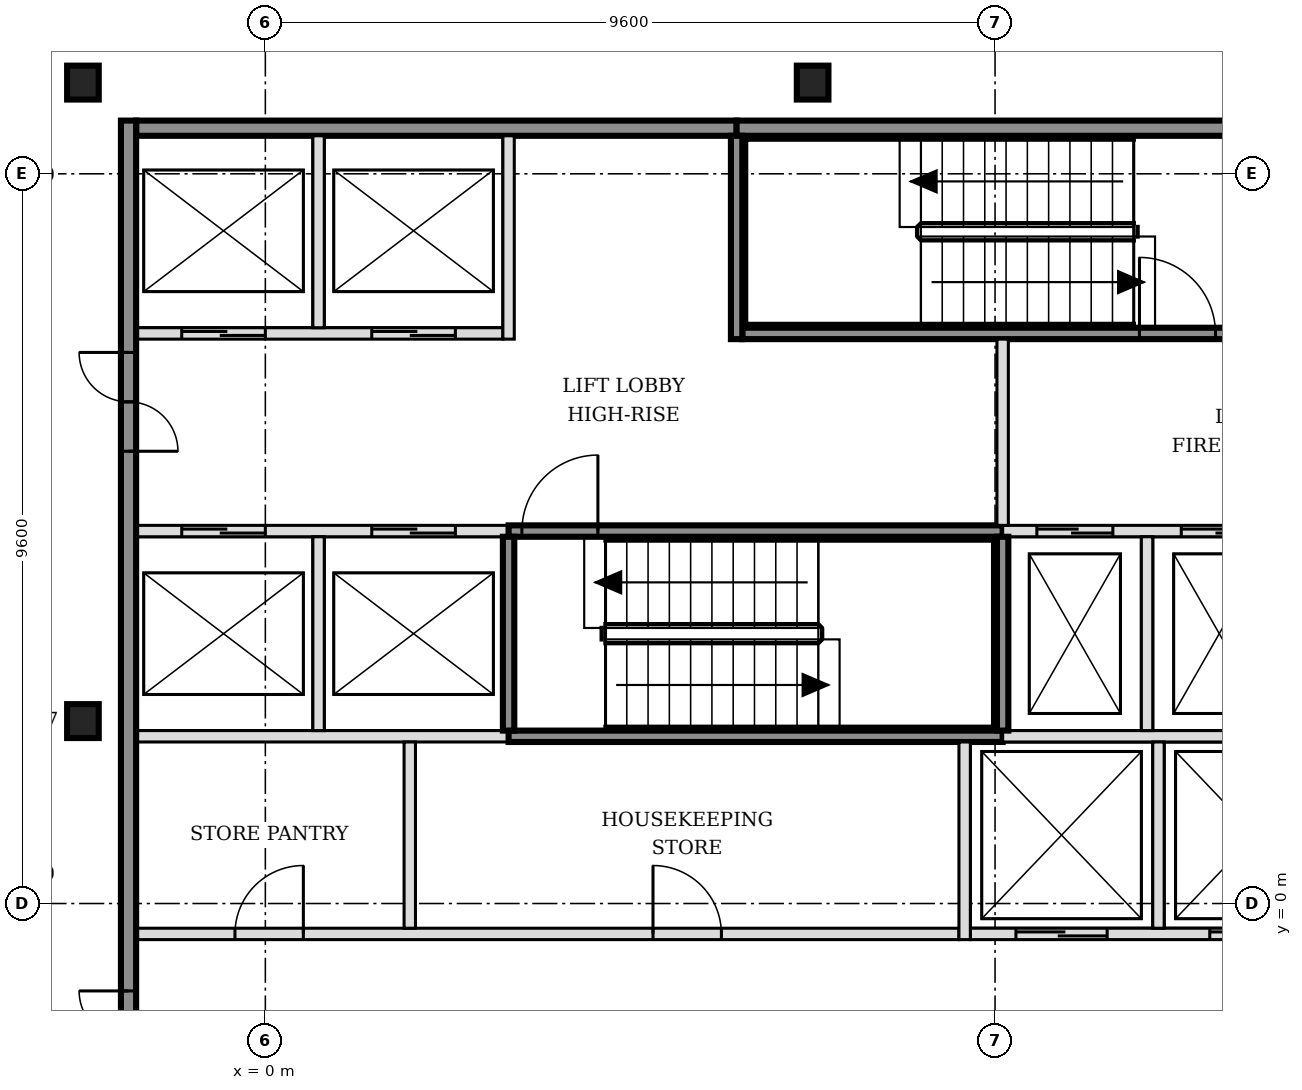
"""IFC4 building model, lengths in metres.
Left out: names, types, materials, properties, quantities, classifications, styles, units other than length and angle.
Written with IfcOpenShell. Run it as: python <this file> out.ifc"""

import sys

from ifc_helpers import new_model, si_unit, direction, frame, frame_2d, origin, origin_2d, place, context, subcontext, project, spatial, rectangle, i_section, extrude, element, fill, save


model = new_model("IFC4")
c1 = context("Model", 3, precision=1e-05, world=origin(), true_north=direction((0.0, 1.0)))
c2 = subcontext(c1, "Body", "Model", "MODEL_VIEW")
j1 = project(units=[si_unit("LENGTHUNIT", "METRE"), si_unit("PLANEANGLEUNIT", "RADIAN")], contexts=[c1])
p1 = place(None, origin())
s1 = spatial("IfcSite", under=j1, at=p1, CompositionType="ELEMENT")
p2 = place(p1, origin())
s2 = spatial("IfcBuilding", under=s1, at=p2, CompositionType="ELEMENT")
p3 = place(p2, frame((0.0, 0.0, 154.2)))
s3 = spatial("IfcBuildingStorey", under=s2, at=p3, CompositionType="ELEMENT", Elevation=154.2)
for number, where, z_axis, x_axis in (
    (1, (-2.4, 2.4, -0.15), (0.0, 0.0, 1.0), (1.0, 0.0, 0.0)),
    (2, (-2.4, 10.8, -0.15), (0.0, 0.0, 1.0), (1.0, 0.0, 0.0)),
    (3, (7.2, 10.8, -0.15), (0.0, 0.0, 1.0), (1.0, 0.0, 0.0)),
):
    element("IfcColumn", number, at=place(p3, frame(where, z_axis=z_axis, x_axis=x_axis)), inside=s3, PredefinedType="COLUMN", context=c2, shape_type="SweptSolid", body=[
        extrude(i_section(OverallWidth=0.416, OverallDepth=0.446, WebThickness=0.039, FlangeThickness=0.063, FilletRadius=0.015, at=origin_2d()), origin(), (0.0, 0.0, 1.0), 3.6),
    ])
p4 = place(p3, frame((-1.7, -0.4, 0.0), z_axis=(0.0, 0.0, 1.0), x_axis=(1.0, 0.0, 0.0)))
e4 = element("IfcWall", 4, at=p4, inside=s3, PredefinedType="PARTITIONING", context=c2, shape_type="SweptSolid", body=[
    extrude(rectangle(XDim=10.825, YDim=0.15, at=frame_2d((5.413, 0.0))), origin(), (0.0, 0.0, 1.0), 3.45),
])
p5 = place(p4, frame((1.3, 0.0, 0.0)))
e5 = element("IfcOpeningElement", 5, at=p5, cuts=e4, PredefinedType="OPENING", context=c2, shape_type="SweptSolid", body=[
    extrude(rectangle(XDim=0.9, YDim=2.1, at=frame_2d((0.45, 1.05))), frame((0.0, 0.085, 0.0), z_axis=(0.0, -1.0, 0.0), x_axis=(1.0, 0.0, 0.0)), (0.0, 0.0, 1.0), 0.17),
])
p6 = place(p4, frame((6.8, 0.0, 0.0)))
e6 = element("IfcOpeningElement", 6, at=p6, cuts=e4, PredefinedType="OPENING", context=c2, shape_type="SweptSolid", body=[
    extrude(rectangle(XDim=0.9, YDim=2.1, at=frame_2d((0.45, 1.05))), frame((0.0, 0.085, 0.0), z_axis=(0.0, -1.0, 0.0), x_axis=(1.0, 0.0, 0.0)), (0.0, 0.0, 1.0), 0.17),
])
p7 = place(p3, frame((9.275, -0.4, 0.0), z_axis=(0.0, 0.0, 1.0), x_axis=(1.0, 0.0, 0.0)))
e7 = element("IfcWall", 7, at=p7, inside=s3, PredefinedType="SOLIDWALL", context=c2, shape_type="SweptSolid", body=[
    extrude(rectangle(XDim=4.95, YDim=0.15, at=frame_2d((2.475, 0.0))), origin(), (0.0, 0.0, 1.0), 3.45),
])
p8 = place(p7, frame((0.6, 0.0, 0.0)))
e8 = element("IfcOpeningElement", 8, at=p8, cuts=e7, PredefinedType="OPENING", context=c2, shape_type="SweptSolid", body=[
    extrude(rectangle(XDim=1.2, YDim=2.1, at=frame_2d((0.6, 1.05))), frame((0.0, 0.085, 0.0), z_axis=(0.0, -1.0, 0.0), x_axis=(1.0, 0.0, 0.0)), (0.0, 0.0, 1.0), 0.17),
])
p9 = place(p7, frame((3.15, 0.0, 0.0)))
e9 = element("IfcOpeningElement", 9, at=p9, cuts=e7, PredefinedType="OPENING", context=c2, shape_type="SweptSolid", body=[
    extrude(rectangle(XDim=1.2, YDim=2.1, at=frame_2d((0.6, 1.05))), frame((0.0, 0.085, 0.0), z_axis=(0.0, -1.0, 0.0), x_axis=(1.0, 0.0, 0.0)), (0.0, 0.0, 1.0), 0.17),
])
p10 = place(p3, frame((-1.7, 2.2, 0.0), z_axis=(0.0, 0.0, 1.0), x_axis=(1.0, 0.0, 0.0)))
e10 = element("IfcWall", 10, at=p10, inside=s3, PredefinedType="SOLIDWALL", context=c2, shape_type="SweptSolid", body=[
    extrude(rectangle(XDim=4.9, YDim=0.15, at=frame_2d((2.45, 0.0))), origin(), (0.0, 0.0, 1.0), 3.45),
])
p11 = place(p3, frame((3.2, 2.2, 0.0), z_axis=(0.0, 0.0, 1.0), x_axis=(1.0, 0.0, 0.0)))
e11 = element("IfcWall", 11, at=p11, inside=s3, PredefinedType="SOLIDWALL", context=c2, shape_type="SweptSolid", body=[
    extrude(rectangle(XDim=6.5, YDim=0.15, at=frame_2d((3.25, 0.0))), origin(), (0.0, 0.0, 1.0), 3.45),
])
p12 = place(p3, frame((9.7, 2.2, 0.0), z_axis=(0.0, 0.0, 1.0), x_axis=(1.0, 0.0, 0.0)))
e12 = element("IfcWall", 12, at=p12, inside=s3, PredefinedType="SOLIDWALL", context=c2, shape_type="SweptSolid", body=[
    extrude(rectangle(XDim=4.525, YDim=0.15, at=frame_2d((2.263, 0.0))), origin(), (0.0, 0.0, 1.0), 3.45),
])
p13 = place(p3, frame((-1.7, 4.9, 0.0), z_axis=(0.0, 0.0, 1.0), x_axis=(1.0, 0.0, 0.0)))
e13 = element("IfcWall", 13, at=p13, inside=s3, PredefinedType="SOLIDWALL", context=c2, shape_type="SweptSolid", body=[
    extrude(rectangle(XDim=4.9, YDim=0.15, at=frame_2d((2.45, 0.0))), origin(), (0.0, 0.0, 1.0), 3.45),
])
p14 = place(p13, frame((0.6, 0.0, 0.0)))
e14 = element("IfcOpeningElement", 14, at=p14, cuts=e13, PredefinedType="OPENING", context=c2, shape_type="SweptSolid", body=[
    extrude(rectangle(XDim=1.1, YDim=2.1, at=frame_2d((0.55, 1.05))), frame((0.0, 0.085, 0.0), z_axis=(0.0, -1.0, 0.0), x_axis=(1.0, 0.0, 0.0)), (0.0, 0.0, 1.0), 0.17),
])
p15 = place(p13, frame((3.1, 0.0, 0.0)))
e15 = element("IfcOpeningElement", 15, at=p15, cuts=e13, PredefinedType="OPENING", context=c2, shape_type="SweptSolid", body=[
    extrude(rectangle(XDim=1.1, YDim=2.1, at=frame_2d((0.55, 1.05))), frame((0.0, 0.085, 0.0), z_axis=(0.0, -1.0, 0.0), x_axis=(1.0, 0.0, 0.0)), (0.0, 0.0, 1.0), 0.17),
])
p16 = place(p3, frame((3.2, 4.9, 0.0), z_axis=(0.0, 0.0, 1.0), x_axis=(1.0, 0.0, 0.0)))
e16 = element("IfcWall", 16, at=p16, inside=s3, PredefinedType="SOLIDWALL", context=c2, shape_type="SweptSolid", body=[
    extrude(rectangle(XDim=6.5, YDim=0.15, at=frame_2d((3.25, 0.0))), origin(), (0.0, 0.0, 1.0), 3.45),
])
p17 = place(p16, frame((0.175, 0.0, 0.0)))
e17 = element("IfcOpeningElement", 17, at=p17, cuts=e16, PredefinedType="OPENING", context=c2, shape_type="SweptSolid", body=[
    extrude(rectangle(XDim=1.0, YDim=2.1, at=frame_2d((0.5, 1.05))), frame((0.0, 0.085, 0.0), z_axis=(0.0, -1.0, 0.0), x_axis=(1.0, 0.0, 0.0)), (0.0, 0.0, 1.0), 0.17),
])
p18 = place(p3, frame((9.7, 4.9, 0.0), z_axis=(0.0, 0.0, 1.0), x_axis=(1.0, 0.0, 0.0)))
e18 = element("IfcWall", 18, at=p18, inside=s3, PredefinedType="SOLIDWALL", context=c2, shape_type="SweptSolid", body=[
    extrude(rectangle(XDim=6.4, YDim=0.15, at=frame_2d((3.2, 0.0))), origin(), (0.0, 0.0, 1.0), 3.45),
])
p19 = place(p18, frame((0.45, 0.0, 0.0)))
e19 = element("IfcOpeningElement", 19, at=p19, cuts=e18, PredefinedType="OPENING", context=c2, shape_type="SweptSolid", body=[
    extrude(rectangle(XDim=1.0, YDim=2.1, at=frame_2d((0.5, 1.05))), frame((0.0, 0.085, 0.0), z_axis=(0.0, -1.0, 0.0), x_axis=(1.0, 0.0, 0.0)), (0.0, 0.0, 1.0), 0.17),
])
p20 = place(p18, frame((2.35, 0.0, 0.0)))
e20 = element("IfcOpeningElement", 20, at=p20, cuts=e18, PredefinedType="OPENING", context=c2, shape_type="SweptSolid", body=[
    extrude(rectangle(XDim=1.0, YDim=2.1, at=frame_2d((0.5, 1.05))), frame((0.0, 0.085, 0.0), z_axis=(0.0, -1.0, 0.0), x_axis=(1.0, 0.0, 0.0)), (0.0, 0.0, 1.0), 0.17),
])
p21 = place(p18, frame((4.7, 0.0, 0.0)))
e21 = element("IfcOpeningElement", 21, at=p21, cuts=e18, PredefinedType="OPENING", context=c2, shape_type="SweptSolid", body=[
    extrude(rectangle(XDim=0.9, YDim=2.1, at=frame_2d((0.45, 1.05))), frame((0.0, 0.085, 0.0), z_axis=(0.0, -1.0, 0.0), x_axis=(1.0, 0.0, 0.0)), (0.0, 0.0, 1.0), 0.17),
])
p22 = place(p3, frame((-1.7, 7.5, 0.0), z_axis=(0.0, 0.0, 1.0), x_axis=(1.0, 0.0, 0.0)))
e22 = element("IfcWall", 22, at=p22, inside=s3, PredefinedType="SOLIDWALL", context=c2, shape_type="SweptSolid", body=[
    extrude(rectangle(XDim=4.825, YDim=0.15, at=frame_2d((2.413, 0.0))), origin(), (0.0, 0.0, 1.0), 3.45),
])
p23 = place(p22, frame((0.6, 0.0, 0.0)))
e23 = element("IfcOpeningElement", 23, at=p23, cuts=e22, PredefinedType="OPENING", context=c2, shape_type="SweptSolid", body=[
    extrude(rectangle(XDim=1.1, YDim=2.1, at=frame_2d((0.55, 1.05))), frame((0.0, 0.085, 0.0), z_axis=(0.0, -1.0, 0.0), x_axis=(1.0, 0.0, 0.0)), (0.0, 0.0, 1.0), 0.17),
])
p24 = place(p22, frame((3.1, 0.0, 0.0)))
e24 = element("IfcOpeningElement", 24, at=p24, cuts=e22, PredefinedType="OPENING", context=c2, shape_type="SweptSolid", body=[
    extrude(rectangle(XDim=1.1, YDim=2.1, at=frame_2d((0.55, 1.05))), frame((0.0, 0.085, 0.0), z_axis=(0.0, -1.0, 0.0), x_axis=(1.0, 0.0, 0.0)), (0.0, 0.0, 1.0), 0.17),
])
p25 = place(p3, frame((6.275, 7.5, 0.0), z_axis=(0.0, 0.0, 1.0), x_axis=(1.0, 0.0, 0.0)))
e25 = element("IfcWall", 25, at=p25, inside=s3, PredefinedType="SOLIDWALL", context=c2, shape_type="SweptSolid", body=[
    extrude(rectangle(XDim=6.425, YDim=0.15, at=frame_2d((3.212, 0.0))), origin(), (0.0, 0.0, 1.0), 3.45),
])
p26 = place(p25, frame((5.225, 0.0, 0.0)))
e26 = element("IfcOpeningElement", 26, at=p26, cuts=e25, PredefinedType="OPENING", context=c2, shape_type="SweptSolid", body=[
    extrude(rectangle(XDim=1.0, YDim=2.1, at=frame_2d((0.5, 1.05))), frame((0.0, 0.085, 0.0), z_axis=(0.0, -1.0, 0.0), x_axis=(1.0, 0.0, 0.0)), (0.0, 0.0, 1.0), 0.17),
])
p27 = place(p3, frame((-1.7, 10.2, 0.0), z_axis=(0.0, 0.0, 1.0), x_axis=(1.0, 0.0, 0.0)))
e27 = element("IfcWall", 27, at=p27, inside=s3, PredefinedType="SOLIDWALL", context=c2, shape_type="SweptSolid", body=[
    extrude(rectangle(XDim=7.9, YDim=0.2, at=frame_2d((3.95, 0.0))), origin(), (0.0, 0.0, 1.0), 3.45),
])
p28 = place(p3, frame((6.2, 10.2, 0.0), z_axis=(0.0, 0.0, 1.0), x_axis=(1.0, 0.0, 0.0)))
e28 = element("IfcWall", 28, at=p28, inside=s3, PredefinedType="SOLIDWALL", context=c2, shape_type="SweptSolid", body=[
    extrude(rectangle(XDim=6.5, YDim=0.2, at=frame_2d((3.25, 0.0))), origin(), (0.0, 0.0, 1.0), 3.45),
])
p29 = place(p3, frame((-1.8, -5.5, 0.0), z_axis=(0.0, 0.0, 1.0), x_axis=(0.0, 1.0, 0.0)))
e29 = element("IfcWall", 29, at=p29, inside=s3, PredefinedType="SOLIDWALL", context=c2, shape_type="SweptSolid", body=[
    extrude(rectangle(XDim=15.8, YDim=0.2, at=frame_2d((7.9, 0.0))), origin(), (0.0, 0.0, 1.0), 3.45),
])
p30 = place(p29, frame((3.05, 0.0, 0.0)))
e30 = element("IfcOpeningElement", 30, at=p30, cuts=e29, PredefinedType="OPENING", context=c2, shape_type="SweptSolid", body=[
    extrude(rectangle(XDim=1.3, YDim=2.1, at=frame_2d((0.65, 1.05))), frame((0.0, 0.11, 0.0), z_axis=(0.0, -1.0, 0.0), x_axis=(1.0, 0.0, 0.0)), (0.0, 0.0, 1.0), 0.22),
])
p31 = place(p29, frame((11.45, 0.0, 0.0)))
e31 = element("IfcOpeningElement", 31, at=p31, cuts=e29, PredefinedType="OPENING", context=c2, shape_type="SweptSolid", body=[
    extrude(rectangle(XDim=1.3, YDim=2.1, at=frame_2d((0.65, 1.05))), frame((0.0, 0.11, 0.0), z_axis=(0.0, -1.0, 0.0), x_axis=(1.0, 0.0, 0.0)), (0.0, 0.0, 1.0), 0.22),
])
p32 = place(p3, frame((0.7, 2.275, 0.0), z_axis=(0.0, 0.0, 1.0), x_axis=(0.0, 1.0, 0.0)))
e32 = element("IfcWall", 32, at=p32, inside=s3, PredefinedType="SOLIDWALL", context=c2, shape_type="SweptSolid", body=[
    extrude(rectangle(XDim=2.55, YDim=0.15, at=frame_2d((1.275, 0.0))), origin(), (0.0, 0.0, 1.0), 3.45),
])
p33 = place(p3, frame((0.7, 7.575, 0.0), z_axis=(0.0, 0.0, 1.0), x_axis=(0.0, 1.0, 0.0)))
e33 = element("IfcWall", 33, at=p33, inside=s3, PredefinedType="SOLIDWALL", context=c2, shape_type="SweptSolid", body=[
    extrude(rectangle(XDim=2.525, YDim=0.15, at=frame_2d((1.263, 0.0))), origin(), (0.0, 0.0, 1.0), 3.45),
])
p34 = place(p3, frame((1.9, -0.325, 0.0), z_axis=(0.0, 0.0, 1.0), x_axis=(0.0, 1.0, 0.0)))
e34 = element("IfcWall", 34, at=p34, inside=s3, PredefinedType="PARTITIONING", context=c2, shape_type="SweptSolid", body=[
    extrude(rectangle(XDim=2.45, YDim=0.15, at=frame_2d((1.225, 0.0))), origin(), (0.0, 0.0, 1.0), 3.45),
])
p35 = place(p3, frame((3.2, 2.275, 0.0), z_axis=(0.0, 0.0, 1.0), x_axis=(0.0, 1.0, 0.0)))
e35 = element("IfcWall", 35, at=p35, inside=s3, PredefinedType="SOLIDWALL", context=c2, shape_type="SweptSolid", body=[
    extrude(rectangle(XDim=2.55, YDim=0.15, at=frame_2d((1.275, 0.0))), origin(), (0.0, 0.0, 1.0), 3.45),
])
for number, where, z_axis, x_axis in (
    (36, (3.2, 7.425, 0.0), (0.0, 0.0, 1.0), (0.0, 1.0, 0.0)),
    (37, (6.2, 7.425, 0.0), (0.0, 0.0, 1.0), (0.0, 1.0, 0.0)),
):
    element("IfcWall", number, at=place(p3, frame(where, z_axis=z_axis, x_axis=x_axis)), inside=s3, PredefinedType="SOLIDWALL", context=c2, shape_type="SweptSolid", body=[
        extrude(rectangle(XDim=2.675, YDim=0.15, at=frame_2d((1.337, 0.0))), origin(), (0.0, 0.0, 1.0), 3.45),
    ])
p36 = place(p3, frame((9.2, -0.475, 0.0), z_axis=(0.0, 0.0, 1.0), x_axis=(0.0, 1.0, 0.0)))
e38 = element("IfcWall", 38, at=p36, inside=s3, PredefinedType="SOLIDWALL", context=c2, shape_type="SweptSolid", body=[
    extrude(rectangle(XDim=2.6, YDim=0.15, at=frame_2d((1.3, 0.0))), origin(), (0.0, 0.0, 1.0), 3.45),
])
p37 = place(p3, frame((9.7, 2.275, 0.0), z_axis=(0.0, 0.0, 1.0), x_axis=(0.0, 1.0, 0.0)))
e39 = element("IfcWall", 39, at=p37, inside=s3, PredefinedType="SOLIDWALL", context=c2, shape_type="SweptSolid", body=[
    extrude(rectangle(XDim=2.55, YDim=0.15, at=frame_2d((1.275, 0.0))), origin(), (0.0, 0.0, 1.0), 3.45),
])
p38 = place(p3, frame((9.7, 4.975, 0.0), z_axis=(0.0, 0.0, 1.0), x_axis=(0.0, 1.0, 0.0)))
e40 = element("IfcWall", 40, at=p38, inside=s3, PredefinedType="SOLIDWALL", context=c2, shape_type="SweptSolid", body=[
    extrude(rectangle(XDim=2.45, YDim=0.15, at=frame_2d((1.225, 0.0))), origin(), (0.0, 0.0, 1.0), 3.45),
])
p39 = place(p3, frame((11.6, 2.275, 0.0), z_axis=(0.0, 0.0, 1.0), x_axis=(0.0, 1.0, 0.0)))
e41 = element("IfcWall", 41, at=p39, inside=s3, PredefinedType="SOLIDWALL", context=c2, shape_type="SweptSolid", body=[
    extrude(rectangle(XDim=2.55, YDim=0.15, at=frame_2d((1.275, 0.0))), origin(), (0.0, 0.0, 1.0), 3.45),
])
p40 = place(p3, frame((11.75, -0.325, 0.0), z_axis=(0.0, 0.0, 1.0), x_axis=(0.0, 1.0, 0.0)))
e42 = element("IfcWall", 42, at=p40, inside=s3, PredefinedType="SOLIDWALL", context=c2, shape_type="SweptSolid", body=[
    extrude(rectangle(XDim=2.45, YDim=0.15, at=frame_2d((1.225, 0.0))), origin(), (0.0, 0.0, 1.0), 3.45),
])
p41 = place(p3, frame((-12.075, 9.319, 0.0), z_axis=(0.0, 0.0, 1.0), x_axis=(0.707106781187, 0.707106781187, 0.0)))
e43 = element("IfcWall", 43, at=p41, inside=s3, PredefinedType="PARTITIONING", context=c2, shape_type="SweptSolid", body=[
    extrude(rectangle(XDim=13.793, YDim=0.15, at=frame_2d((6.896, 0.0))), origin(), (0.0, 0.0, 1.0), 2.73),
])
p42 = place(p41, frame((11.692, 0.0, 0.0)))
e44 = element("IfcOpeningElement", 44, at=p42, cuts=e43, PredefinedType="OPENING", context=c2, shape_type="SweptSolid", body=[
    extrude(rectangle(XDim=0.9, YDim=2.1, at=frame_2d((0.45, 1.05))), frame((0.0, 0.085, 0.0), z_axis=(0.0, -1.0, 0.0), x_axis=(1.0, 0.0, 0.0)), (0.0, 0.0, 1.0), 0.17),
])
p43 = place(p41, frame((7.376, 0.0, 0.0)))
e45 = element("IfcOpeningElement", 45, at=p43, cuts=e43, PredefinedType="OPENING", context=c2, shape_type="SweptSolid", body=[
    extrude(rectangle(XDim=0.9, YDim=2.1, at=frame_2d((0.45, 1.05))), frame((0.0, 0.085, 0.0), z_axis=(0.0, -1.0, 0.0), x_axis=(1.0, 0.0, 0.0)), (0.0, 0.0, 1.0), 0.17),
])
p44 = place(p41, frame((3.62, 0.0, 0.0)))
e46 = element("IfcOpeningElement", 46, at=p44, cuts=e43, PredefinedType="OPENING", context=c2, shape_type="SweptSolid", body=[
    extrude(rectangle(XDim=0.9, YDim=2.1, at=frame_2d((0.45, 1.05))), frame((0.0, 0.085, 0.0), z_axis=(0.0, -1.0, 0.0), x_axis=(1.0, 0.0, 0.0)), (0.0, 0.0, 1.0), 0.17),
])
p45 = place(p8, origin())
e47 = element("IfcDoor", 47, at=p45, inside=s3, OperationType="DOUBLE_DOOR_SLIDING", PredefinedType="DOOR", context=c2, shape_type="SweptSolid", body=[
    extrude(rectangle(XDim=1.2, YDim=2.1, at=frame_2d((0.6, 1.05))), frame((0.0, 0.025, 0.0), z_axis=(0.0, -1.0, 0.0), x_axis=(1.0, 0.0, 0.0)), (0.0, 0.0, 1.0), 0.05),
])
fill(e8, e47)
p46 = place(p9, origin())
e48 = element("IfcDoor", 48, at=p46, inside=s3, OperationType="DOUBLE_DOOR_SLIDING", PredefinedType="DOOR", context=c2, shape_type="SweptSolid", body=[
    extrude(rectangle(XDim=1.2, YDim=2.1, at=frame_2d((0.6, 1.05))), frame((0.0, 0.025, 0.0), z_axis=(0.0, -1.0, 0.0), x_axis=(1.0, 0.0, 0.0)), (0.0, 0.0, 1.0), 0.05),
])
fill(e9, e48)
p47 = place(p14, origin())
e49 = element("IfcDoor", 49, at=p47, inside=s3, OperationType="DOUBLE_DOOR_SLIDING", PredefinedType="DOOR", context=c2, shape_type="SweptSolid", body=[
    extrude(rectangle(XDim=1.1, YDim=2.1, at=frame_2d((0.55, 1.05))), frame((0.0, 0.025, 0.0), z_axis=(0.0, -1.0, 0.0), x_axis=(1.0, 0.0, 0.0)), (0.0, 0.0, 1.0), 0.05),
])
fill(e14, e49)
p48 = place(p15, origin())
e50 = element("IfcDoor", 50, at=p48, inside=s3, OperationType="DOUBLE_DOOR_SLIDING", PredefinedType="DOOR", context=c2, shape_type="SweptSolid", body=[
    extrude(rectangle(XDim=1.1, YDim=2.1, at=frame_2d((0.55, 1.05))), frame((0.0, 0.025, 0.0), z_axis=(0.0, -1.0, 0.0), x_axis=(1.0, 0.0, 0.0)), (0.0, 0.0, 1.0), 0.05),
])
fill(e15, e50)
p49 = place(p23, origin())
e51 = element("IfcDoor", 51, at=p49, inside=s3, OperationType="DOUBLE_DOOR_SLIDING", PredefinedType="DOOR", context=c2, shape_type="SweptSolid", body=[
    extrude(rectangle(XDim=1.1, YDim=2.1, at=frame_2d((0.55, 1.05))), frame((0.0, 0.025, 0.0), z_axis=(0.0, -1.0, 0.0), x_axis=(1.0, 0.0, 0.0)), (0.0, 0.0, 1.0), 0.05),
])
fill(e23, e51)
p50 = place(p24, origin())
e52 = element("IfcDoor", 52, at=p50, inside=s3, OperationType="DOUBLE_DOOR_SLIDING", PredefinedType="DOOR", context=c2, shape_type="SweptSolid", body=[
    extrude(rectangle(XDim=1.1, YDim=2.1, at=frame_2d((0.55, 1.05))), frame((0.0, 0.025, 0.0), z_axis=(0.0, -1.0, 0.0), x_axis=(1.0, 0.0, 0.0)), (0.0, 0.0, 1.0), 0.05),
])
fill(e24, e52)
p51 = place(p19, origin())
e53 = element("IfcDoor", 53, at=p51, inside=s3, OperationType="DOUBLE_DOOR_SLIDING", PredefinedType="DOOR", context=c2, shape_type="SweptSolid", body=[
    extrude(rectangle(XDim=1.0, YDim=2.1, at=frame_2d((0.5, 1.05))), frame((0.0, 0.025, 0.0), z_axis=(0.0, -1.0, 0.0), x_axis=(1.0, 0.0, 0.0)), (0.0, 0.0, 1.0), 0.05),
])
fill(e19, e53)
p52 = place(p20, origin())
e54 = element("IfcDoor", 54, at=p52, inside=s3, OperationType="DOUBLE_DOOR_SLIDING", PredefinedType="DOOR", context=c2, shape_type="SweptSolid", body=[
    extrude(rectangle(XDim=1.0, YDim=2.1, at=frame_2d((0.5, 1.05))), frame((0.0, 0.025, 0.0), z_axis=(0.0, -1.0, 0.0), x_axis=(1.0, 0.0, 0.0)), (0.0, 0.0, 1.0), 0.05),
])
fill(e20, e54)
p53 = place(p17, origin())
e55 = element("IfcDoor", 55, at=p53, inside=s3, OperationType="SINGLE_SWING_RIGHT", PredefinedType="DOOR", context=c2, shape_type="SweptSolid", body=[
    extrude(rectangle(XDim=1.0, YDim=2.1, at=frame_2d((0.5, 1.05))), frame((0.0, 0.025, 0.0), z_axis=(0.0, -1.0, 0.0), x_axis=(1.0, 0.0, 0.0)), (0.0, 0.0, 1.0), 0.05),
])
fill(e17, e55)
p54 = place(p26, origin())
e56 = element("IfcDoor", 56, at=p54, inside=s3, OperationType="SINGLE_SWING_LEFT", PredefinedType="DOOR", context=c2, shape_type="SweptSolid", body=[
    extrude(rectangle(XDim=1.0, YDim=2.1, at=frame_2d((0.5, 1.05))), frame((0.0, 0.025, 0.0), z_axis=(0.0, -1.0, 0.0), x_axis=(1.0, 0.0, 0.0)), (0.0, 0.0, 1.0), 0.05),
])
fill(e26, e56)
p55 = place(p30, origin())
e57 = element("IfcDoor", 57, at=p55, inside=s3, OperationType="DOUBLE_DOOR_SINGLE_SWING", PredefinedType="DOOR", context=c2, shape_type="SweptSolid", body=[
    extrude(rectangle(XDim=1.3, YDim=2.1, at=frame_2d((0.65, 1.05))), frame((0.0, 0.025, 0.0), z_axis=(0.0, -1.0, 0.0), x_axis=(1.0, 0.0, 0.0)), (0.0, 0.0, 1.0), 0.05),
])
fill(e30, e57)
p56 = place(p31, origin())
e58 = element("IfcDoor", 58, at=p56, inside=s3, OperationType="DOUBLE_DOOR_SINGLE_SWING", PredefinedType="DOOR", context=c2, shape_type="SweptSolid", body=[
    extrude(rectangle(XDim=1.3, YDim=2.1, at=frame_2d((0.65, 1.05))), frame((0.0, 0.025, 0.0), z_axis=(0.0, -1.0, 0.0), x_axis=(1.0, 0.0, 0.0)), (0.0, 0.0, 1.0), 0.05),
])
fill(e31, e58)
p57 = place(p5, origin())
e59 = element("IfcDoor", 59, at=p57, inside=s3, OperationType="SINGLE_SWING_RIGHT", PredefinedType="DOOR", context=c2, shape_type="SweptSolid", body=[
    extrude(rectangle(XDim=0.9, YDim=2.1, at=frame_2d((0.45, 1.05))), frame((0.0, 0.025, 0.0), z_axis=(0.0, -1.0, 0.0), x_axis=(1.0, 0.0, 0.0)), (0.0, 0.0, 1.0), 0.05),
])
fill(e5, e59)
p58 = place(p6, origin())
e60 = element("IfcDoor", 60, at=p58, inside=s3, OperationType="SINGLE_SWING_LEFT", PredefinedType="DOOR", context=c2, shape_type="SweptSolid", body=[
    extrude(rectangle(XDim=0.9, YDim=2.1, at=frame_2d((0.45, 1.05))), frame((0.0, 0.025, 0.0), z_axis=(0.0, -1.0, 0.0), x_axis=(1.0, 0.0, 0.0)), (0.0, 0.0, 1.0), 0.05),
])
fill(e6, e60)
save(model, sys.argv[1])
